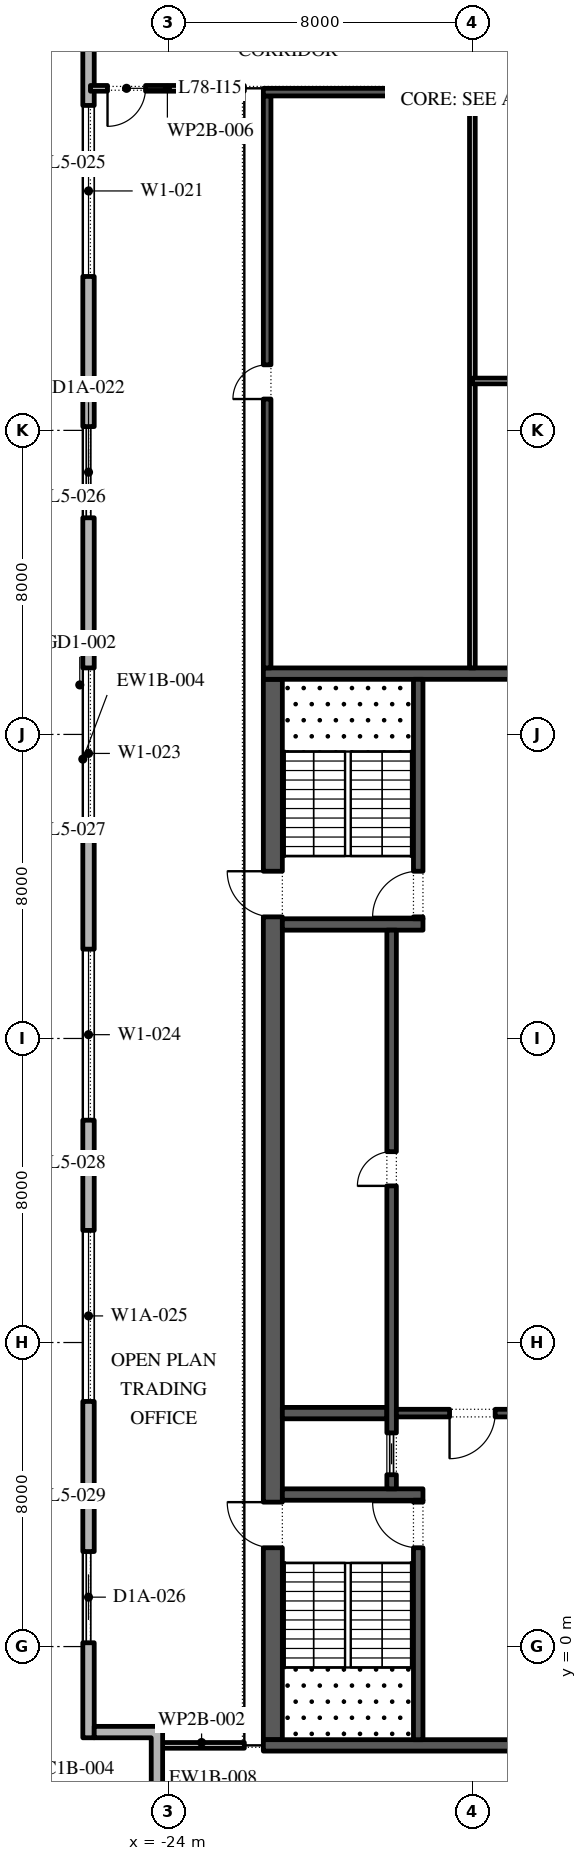
"""IFC4 building model, lengths in metres.
Left out: names, types, materials, properties, quantities, classifications, styles, units other than length and angle.
Written with IfcOpenShell. Run it as: python <this file> out.ifc"""

import sys

from ifc_helpers import new_model, si_unit, direction, frame, frame_2d, origin, place, context, subcontext, project, spatial, polyline, rectangle, outline, extrude, element, fill, save


model = new_model("IFC4")
c1 = context("Model", 3, precision=1e-05, world=origin(), true_north=direction((0.0, 1.0)))
c2 = subcontext(c1, "Body", "Model", "MODEL_VIEW")
j1 = project(units=[si_unit("LENGTHUNIT", "METRE"), si_unit("PLANEANGLEUNIT", "RADIAN")], contexts=[c1])
p1 = place(None, origin())
s1 = spatial("IfcSite", under=j1, at=p1, CompositionType="ELEMENT")
p2 = place(p1, origin())
s2 = spatial("IfcBuilding", under=s1, at=p2, CompositionType="ELEMENT")
p3 = place(p2, frame((0.0, 0.0, 355.2)))
s3 = spatial("IfcBuildingStorey", under=s2, at=p3, CompositionType="ELEMENT", Elevation=355.2)
p4 = place(p3, frame((-26.1, 49.1, 0.0), z_axis=(0.0, 0.0, 1.0), x_axis=(0.0, -1.0, 0.0)))
e1 = element("IfcWall", 1, at=p4, inside=s3, PredefinedType="STANDARD", context=c2, shape_type="SweptSolid", body=[
    extrude(rectangle(XDim=51.5, YDim=0.3, at=frame_2d((25.75, 0.0))), origin(), (0.0, 0.0, 1.0), 3.95),
])
p5 = place(p4, frame((1.3, 0.0, 0.45)))
e2 = element("IfcOpeningElement", 2, at=p5, cuts=e1, PredefinedType="OPENING", context=c2, shape_type="SweptSolid", body=[
    extrude(rectangle(XDim=4.5, YDim=3.05, at=frame_2d((2.25, 1.525))), frame((0.0, 0.16, 0.0), z_axis=(0.0, -1.0, 0.0), x_axis=(1.0, 0.0, 0.0)), (0.0, 0.0, 1.0), 0.32),
])
p6 = place(p4, frame((8.55, 0.0, 0.45)))
e3 = element("IfcOpeningElement", 3, at=p6, cuts=e1, PredefinedType="OPENING", context=c2, shape_type="SweptSolid", body=[
    extrude(rectangle(XDim=4.5, YDim=3.05, at=frame_2d((2.25, 1.525))), frame((0.0, 0.16, 0.0), z_axis=(0.0, -1.0, 0.0), x_axis=(1.0, 0.0, 0.0)), (0.0, 0.0, 1.0), 0.32),
])
p7 = place(p4, frame((17.0, 0.0, 0.0)))
e4 = element("IfcOpeningElement", 4, at=p7, cuts=e1, PredefinedType="OPENING", context=c2, shape_type="SweptSolid", body=[
    extrude(rectangle(XDim=2.4, YDim=3.45, at=frame_2d((1.2, 1.725))), frame((0.0, 0.16, 0.0), z_axis=(0.0, -1.0, 0.0), x_axis=(1.0, 0.0, 0.0)), (0.0, 0.0, 1.0), 0.32),
])
p8 = place(p4, frame((23.35, 0.0, 0.45)))
e5 = element("IfcOpeningElement", 5, at=p8, cuts=e1, PredefinedType="OPENING", context=c2, shape_type="SweptSolid", body=[
    extrude(rectangle(XDim=4.5, YDim=3.05, at=frame_2d((2.25, 1.525))), frame((0.0, 0.16, 0.0), z_axis=(0.0, -1.0, 0.0), x_axis=(1.0, 0.0, 0.0)), (0.0, 0.0, 1.0), 0.32),
])
p9 = place(p4, frame((30.75, 0.0, 0.45)))
e6 = element("IfcOpeningElement", 6, at=p9, cuts=e1, PredefinedType="OPENING", context=c2, shape_type="SweptSolid", body=[
    extrude(rectangle(XDim=4.5, YDim=3.05, at=frame_2d((2.25, 1.525))), frame((0.0, 0.16, 0.0), z_axis=(0.0, -1.0, 0.0), x_axis=(1.0, 0.0, 0.0)), (0.0, 0.0, 1.0), 0.32),
])
p10 = place(p4, frame((38.15, 0.0, 0.45)))
e7 = element("IfcOpeningElement", 7, at=p10, cuts=e1, PredefinedType="OPENING", context=c2, shape_type="SweptSolid", body=[
    extrude(rectangle(XDim=4.5, YDim=3.0, at=frame_2d((2.25, 1.5))), frame((0.0, 0.16, 0.0), z_axis=(0.0, -1.0, 0.0), x_axis=(1.0, 0.0, 0.0)), (0.0, 0.0, 1.0), 0.32),
])
p11 = place(p4, frame((46.6, 0.0, 0.0)))
e8 = element("IfcOpeningElement", 8, at=p11, cuts=e1, PredefinedType="OPENING", context=c2, shape_type="SweptSolid", body=[
    extrude(rectangle(XDim=2.4, YDim=3.45, at=frame_2d((1.2, 1.725))), frame((0.0, 0.16, 0.0), z_axis=(0.0, -1.0, 0.0), x_axis=(1.0, 0.0, 0.0)), (0.0, 0.0, 1.0), 0.32),
])
p12 = place(p3, origin())
e9 = element("IfcWall", 9, at=p12, inside=s3, PredefinedType="STANDARD", context=c2, shape_type="SweptSolid", body=[
    extrude(outline(polyline([(-22.65, -4.2), (-24.45, -4.2), (-24.45, -2.4), (-25.95, -2.4), (-25.95, -2.1), (-24.15, -2.1), (-24.15, -3.9), (-22.35, -3.9), (-22.35, -6.0), (-22.65, -6.0), (-22.65, -4.2)])), origin(), (0.0, 0.0, 1.0), 3.95),
])
p13 = place(p3, frame((-21.25, -2.45, 0.0), z_axis=(0.0, 0.0, 1.0), x_axis=(0.0, 1.0, 0.0)))
e10 = element("IfcWall", 10, at=p13, inside=s3, PredefinedType="SHEAR", context=c2, shape_type="SweptSolid", body=[
    extrude(rectangle(XDim=27.9, YDim=0.5, at=frame_2d((13.95, 0.0))), origin(), (0.0, 0.0, 1.0), 3.95),
])
p14 = place(p13, frame((5.05, 0.0, 0.0)))
e11 = element("IfcOpeningElement", 11, at=p14, cuts=e10, PredefinedType="OPENING", context=c2, shape_type="SweptSolid", body=[
    extrude(rectangle(XDim=1.2, YDim=2.1, at=frame_2d((0.6, 1.05))), frame((0.0, 0.26, 0.0), z_axis=(0.0, -1.0, 0.0), x_axis=(1.0, 0.0, 0.0)), (0.0, 0.0, 1.0), 0.52),
])
p15 = place(p13, frame((21.65, 0.0, 0.0)))
e12 = element("IfcOpeningElement", 12, at=p15, cuts=e10, PredefinedType="OPENING", context=c2, shape_type="SweptSolid", body=[
    extrude(rectangle(XDim=1.2, YDim=2.1, at=frame_2d((0.6, 1.05))), frame((0.0, 0.26, 0.0), z_axis=(0.0, -1.0, 0.0), x_axis=(1.0, 0.0, 0.0)), (0.0, 0.0, 1.0), 0.52),
])
for number, where, z_axis, x_axis in (
    (13, (-21.5, -2.6, 0.0), (0.0, 0.0, 1.0), (1.0, 0.0, 0.0)),
    (14, (-21.5, 25.6, 0.0), (0.0, 0.0, 1.0), (1.0, 0.0, 0.0)),
):
    element("IfcWall", number, at=place(p3, frame(where, z_axis=z_axis, x_axis=x_axis)), inside=s3, PredefinedType="SHEAR", context=c2, shape_type="SweptSolid", body=[
        extrude(rectangle(XDim=11.0, YDim=0.3, at=frame_2d((5.5, 0.0))), origin(), (0.0, 0.0, 1.0), 3.95),
    ])
p16 = place(p3, frame((-21.0, 4.0, 0.0), z_axis=(0.0, 0.0, 1.0), x_axis=(1.0, 0.0, 0.0)))
e15 = element("IfcWall", 15, at=p16, inside=s3, PredefinedType="SHEAR", context=c2, shape_type="SweptSolid", body=[
    extrude(rectangle(XDim=3.7, YDim=0.3, at=frame_2d((1.85, 0.0))), origin(), (0.0, 0.0, 1.0), 3.95),
])
p17 = place(p3, frame((-17.425, -2.45, 0.0), z_axis=(0.0, 0.0, 1.0), x_axis=(0.0, 1.0, 0.0)))
e16 = element("IfcWall", 16, at=p17, inside=s3, PredefinedType="SHEAR", context=c2, shape_type="SweptSolid", body=[
    extrude(rectangle(XDim=6.3, YDim=0.25, at=frame_2d((3.15, 0.0))), origin(), (0.0, 0.0, 1.0), 3.95),
])
p18 = place(p17, frame((5.05, 0.0, 0.0)))
e17 = element("IfcOpeningElement", 17, at=p18, cuts=e16, PredefinedType="OPENING", context=c2, shape_type="SweptSolid", body=[
    extrude(rectangle(XDim=1.2, YDim=2.1, at=frame_2d((0.6, 1.05))), frame((0.0, 0.135, 0.0), z_axis=(0.0, -1.0, 0.0), x_axis=(1.0, 0.0, 0.0)), (0.0, 0.0, 1.0), 0.27),
])
p19 = place(p3, frame((-21.0, 19.0, 0.0), z_axis=(0.0, 0.0, 1.0), x_axis=(1.0, 0.0, 0.0)))
e18 = element("IfcWall", 18, at=p19, inside=s3, PredefinedType="SHEAR", context=c2, shape_type="SweptSolid", body=[
    extrude(rectangle(XDim=3.7, YDim=0.3, at=frame_2d((1.85, 0.0))), origin(), (0.0, 0.0, 1.0), 3.95),
])
p20 = place(p3, frame((-17.425, 19.15, 0.0), z_axis=(0.0, 0.0, 1.0), x_axis=(0.0, 1.0, 0.0)))
e19 = element("IfcWall", 19, at=p20, inside=s3, PredefinedType="SHEAR", context=c2, shape_type="SweptSolid", body=[
    extrude(rectangle(XDim=6.3, YDim=0.25, at=frame_2d((3.15, 0.0))), origin(), (0.0, 0.0, 1.0), 3.95),
])
p21 = place(p20, frame((0.05, 0.0, 0.0)))
e20 = element("IfcOpeningElement", 20, at=p21, cuts=e19, PredefinedType="OPENING", context=c2, shape_type="SweptSolid", body=[
    extrude(rectangle(XDim=1.2, YDim=2.1, at=frame_2d((0.6, 1.05))), frame((0.0, 0.135, 0.0), z_axis=(0.0, -1.0, 0.0), x_axis=(1.0, 0.0, 0.0)), (0.0, 0.0, 1.0), 0.27),
])
p22 = place(p3, frame((-21.0, 6.143, 0.0), z_axis=(0.0, 0.0, 1.0), x_axis=(1.0, 0.0, 0.0)))
e21 = element("IfcWall", 21, at=p22, inside=s3, PredefinedType="SHEAR", context=c2, shape_type="SweptSolid", body=[
    extrude(rectangle(XDim=2.75, YDim=0.3, at=frame_2d((1.375, 0.0))), origin(), (0.0, 0.0, 1.0), 3.95),
])
p23 = place(p3, frame((-18.125, 4.15, 0.0), z_axis=(0.0, 0.0, 1.0), x_axis=(0.0, 1.0, 0.0)))
e22 = element("IfcWall", 22, at=p23, inside=s3, PredefinedType="SHEAR", context=c2, shape_type="SweptSolid", body=[
    extrude(rectangle(XDim=14.7, YDim=0.25, at=frame_2d((7.35, 0.0))), origin(), (0.0, 0.0, 1.0), 3.95),
])
p24 = place(p23, frame((7.971, 0.0, 0.0)))
e23 = element("IfcOpeningElement", 23, at=p24, cuts=e22, PredefinedType="OPENING", context=c2, shape_type="SweptSolid", body=[
    extrude(rectangle(XDim=0.9, YDim=2.1, at=frame_2d((0.45, 1.05))), frame((0.0, 0.135, 0.0), z_axis=(0.0, -1.0, 0.0), x_axis=(1.0, 0.0, 0.0)), (0.0, 0.0, 1.0), 0.27),
])
p25 = place(p23, frame((0.371, 0.0, 0.0)))
e24 = element("IfcOpeningElement", 24, at=p25, cuts=e22, PredefinedType="OPENING", context=c2, shape_type="SweptSolid", body=[
    extrude(rectangle(XDim=1.1, YDim=2.1, at=frame_2d((0.55, 1.05))), frame((0.0, 0.135, 0.0), z_axis=(0.0, -1.0, 0.0), x_axis=(1.0, 0.0, 0.0)), (0.0, 0.0, 1.0), 0.27),
])
p26 = place(p3, frame((-18.0, 6.143, 0.0), z_axis=(0.0, 0.0, 1.0), x_axis=(1.0, 0.0, 0.0)))
e25 = element("IfcWall", 25, at=p26, inside=s3, PredefinedType="SHEAR", context=c2, shape_type="SweptSolid", body=[
    extrude(rectangle(XDim=4.0, YDim=0.2, at=frame_2d((2.0, 0.0))), origin(), (0.0, 0.0, 1.0), 3.95),
])
p27 = place(p26, frame((1.4, 0.0, 0.0)))
e26 = element("IfcOpeningElement", 26, at=p27, cuts=e25, PredefinedType="OPENING", context=c2, shape_type="SweptSolid", body=[
    extrude(rectangle(XDim=1.2, YDim=2.1, at=frame_2d((0.6, 1.05))), frame((0.0, 0.11, 0.0), z_axis=(0.0, -1.0, 0.0), x_axis=(1.0, 0.0, 0.0)), (0.0, 0.0, 1.0), 0.22),
])
p28 = place(p3, frame((-21.4, 25.75, 0.0), z_axis=(0.0, 0.0, 1.0), x_axis=(0.0, 1.0, 0.0)))
e27 = element("IfcWall", 27, at=p28, inside=s3, PredefinedType="SHEAR", context=c2, shape_type="SweptSolid", body=[
    extrude(rectangle(XDim=15.05, YDim=0.2, at=frame_2d((7.525, 0.0))), origin(), (0.0, 0.0, 1.0), 3.95),
])
p29 = place(p28, frame((7.075, 0.0, 0.0)))
e28 = element("IfcOpeningElement", 28, at=p29, cuts=e27, PredefinedType="OPENING", context=c2, shape_type="SweptSolid", body=[
    extrude(rectangle(XDim=0.9, YDim=2.1, at=frame_2d((0.45, 1.05))), frame((0.0, 0.11, 0.0), z_axis=(0.0, -1.0, 0.0), x_axis=(1.0, 0.0, 0.0)), (0.0, 0.0, 1.0), 0.22),
])
p30 = place(p3, frame((-21.5, 40.9, 0.0), z_axis=(0.0, 0.0, 1.0), x_axis=(1.0, 0.0, 0.0)))
e29 = element("IfcWall", 29, at=p30, inside=s3, PredefinedType="SHEAR", context=c2, shape_type="SweptSolid", body=[
    extrude(rectangle(XDim=11.0, YDim=0.2, at=frame_2d((5.5, 0.0))), origin(), (0.0, 0.0, 1.0), 3.95),
])
p31 = place(p3, frame((-16.0, 25.75, 0.0), z_axis=(0.0, 0.0, 1.0), x_axis=(0.0, 1.0, 0.0)))
e30 = element("IfcWall", 30, at=p31, inside=s3, PredefinedType="PARTITIONING", context=c2, shape_type="SweptSolid", body=[
    extrude(rectangle(XDim=15.05, YDim=0.15, at=frame_2d((7.525, 0.0))), origin(), (0.0, 0.0, 1.0), 3.95),
])
p32 = place(p3, frame((-16.0, 33.3, 0.0), z_axis=(0.0, 0.0, 1.0), x_axis=(1.0, 0.0, 0.0)))
e31 = element("IfcWall", 31, at=p32, inside=s3, PredefinedType="PARTITIONING", context=c2, shape_type="SweptSolid", body=[
    extrude(rectangle(XDim=5.3, YDim=0.15, at=frame_2d((2.65, 0.0))), origin(), (0.0, 0.0, 1.0), 3.95),
])
p33 = place(p3, frame((-24.25, -2.6, 0.0), z_axis=(0.0, 0.0, 1.0), x_axis=(1.0, 0.0, 0.0)))
e32 = element("IfcWall", 32, at=p33, inside=s3, PredefinedType="PARTITIONING", context=c2, shape_type="SweptSolid", body=[
    extrude(rectangle(XDim=2.25, YDim=0.15, at=frame_2d((1.125, 0.0))), origin(), (0.0, 0.0, 1.0), 3.95),
])
p34 = place(p3, frame((-22.0, 41.0, 0.0), z_axis=(0.0, 0.0, 1.0), x_axis=(-1.0, 0.0, 0.0)))
e33 = element("IfcWall", 33, at=p34, inside=s3, PredefinedType="PARTITIONING", context=c2, shape_type="SweptSolid", body=[
    extrude(rectangle(XDim=4.05, YDim=0.15, at=frame_2d((2.025, 0.0))), origin(), (0.0, 0.0, 1.0), 3.95),
])
p35 = place(p34, frame((2.6, 0.0, 0.0)))
e34 = element("IfcOpeningElement", 34, at=p35, cuts=e33, PredefinedType="OPENING", context=c2, shape_type="SweptSolid", body=[
    extrude(rectangle(XDim=1.0, YDim=2.1, at=frame_2d((0.5, 1.05))), frame((0.0, 0.085, 0.0), z_axis=(0.0, -1.0, 0.0), x_axis=(1.0, 0.0, 0.0)), (0.0, 0.0, 1.0), 0.17),
])
p36 = place(p6, origin())
e35 = element("IfcWindow", 35, at=p36, inside=s3, PartitioningType="DOUBLE_PANEL_VERTICAL", PredefinedType="WINDOW", context=c2, shape_type="SweptSolid", body=[
    extrude(rectangle(XDim=4.5, YDim=3.05, at=frame_2d((2.25, 1.525))), frame((0.0, 0.03, 0.0), z_axis=(0.0, -1.0, 0.0), x_axis=(1.0, 0.0, 0.0)), (0.0, 0.0, 1.0), 0.06),
])
fill(e3, e35)
p37 = place(p7, origin())
e36 = element("IfcDoor", 36, at=p37, inside=s3, OperationType="DOUBLE_DOOR_SLIDING", PredefinedType="DOOR", context=c2, shape_type="SweptSolid", body=[
    extrude(rectangle(XDim=2.4, YDim=3.45, at=frame_2d((1.2, 1.725))), frame((0.0, 0.025, 0.0), z_axis=(0.0, -1.0, 0.0), x_axis=(1.0, 0.0, 0.0)), (0.0, 0.0, 1.0), 0.05),
])
fill(e4, e36)
p38 = place(p8, origin())
e37 = element("IfcWindow", 37, at=p38, inside=s3, PartitioningType="DOUBLE_PANEL_VERTICAL", PredefinedType="WINDOW", context=c2, shape_type="SweptSolid", body=[
    extrude(rectangle(XDim=4.5, YDim=3.05, at=frame_2d((2.25, 1.525))), frame((0.0, 0.03, 0.0), z_axis=(0.0, -1.0, 0.0), x_axis=(1.0, 0.0, 0.0)), (0.0, 0.0, 1.0), 0.06),
])
fill(e5, e37)
p39 = place(p9, origin())
e38 = element("IfcWindow", 38, at=p39, inside=s3, PartitioningType="DOUBLE_PANEL_VERTICAL", PredefinedType="WINDOW", context=c2, shape_type="SweptSolid", body=[
    extrude(rectangle(XDim=4.5, YDim=3.05, at=frame_2d((2.25, 1.525))), frame((0.0, 0.03, 0.0), z_axis=(0.0, -1.0, 0.0), x_axis=(1.0, 0.0, 0.0)), (0.0, 0.0, 1.0), 0.06),
])
fill(e6, e38)
p40 = place(p10, origin())
e39 = element("IfcWindow", 39, at=p40, inside=s3, PartitioningType="DOUBLE_PANEL_VERTICAL", PredefinedType="WINDOW", context=c2, shape_type="SweptSolid", body=[
    extrude(rectangle(XDim=4.5, YDim=3.0, at=frame_2d((2.25, 1.5))), frame((0.0, 0.03, 0.0), z_axis=(0.0, -1.0, 0.0), x_axis=(1.0, 0.0, 0.0)), (0.0, 0.0, 1.0), 0.06),
])
fill(e7, e39)
p41 = place(p11, origin())
e40 = element("IfcDoor", 40, at=p41, inside=s3, OperationType="DOUBLE_DOOR_SLIDING", PredefinedType="DOOR", context=c2, shape_type="SweptSolid", body=[
    extrude(rectangle(XDim=2.4, YDim=3.45, at=frame_2d((1.2, 1.725))), frame((0.0, 0.025, 0.0), z_axis=(0.0, -1.0, 0.0), x_axis=(1.0, 0.0, 0.0)), (0.0, 0.0, 1.0), 0.05),
])
fill(e8, e40)
p42 = place(p24, origin())
e41 = element("IfcDoor", 41, at=p42, inside=s3, OperationType="SINGLE_SWING_RIGHT", PredefinedType="DOOR", context=c2, shape_type="SweptSolid", body=[
    extrude(rectangle(XDim=0.9, YDim=2.1, at=frame_2d((0.45, 1.05))), frame((0.0, 0.125, 0.0), z_axis=(0.0, -1.0, 0.0), x_axis=(1.0, 0.0, 0.0)), (0.0, 0.0, 1.0), 0.05),
])
fill(e23, e41)
p43 = place(p25, origin())
e42 = element("IfcDoor", 42, at=p43, inside=s3, OperationType="SLIDING_TO_LEFT", PredefinedType="DOOR", context=c2, shape_type="SweptSolid", body=[
    extrude(rectangle(XDim=1.1, YDim=2.1, at=frame_2d((0.55, 1.05))), frame((0.0, 0.025, 0.0), z_axis=(0.0, -1.0, 0.0), x_axis=(1.0, 0.0, 0.0)), (0.0, 0.0, 1.0), 0.05),
])
fill(e24, e42)
p44 = place(p27, frame((1.2, 0.0, 0.0), z_axis=(0.0, 0.0, 1.0), x_axis=(-1.0, 0.0, 0.0)))
e43 = element("IfcDoor", 43, at=p44, inside=s3, OperationType="SINGLE_SWING_LEFT", PredefinedType="DOOR", context=c2, shape_type="SweptSolid", body=[
    extrude(rectangle(XDim=1.2, YDim=2.1, at=frame_2d((0.6, 1.05))), frame((0.0, 0.025, 0.0), z_axis=(0.0, -1.0, 0.0), x_axis=(1.0, 0.0, 0.0)), (0.0, 0.0, 1.0), 0.05),
])
fill(e26, e43)
p45 = place(p18, origin())
e44 = element("IfcDoor", 44, at=p45, inside=s3, OperationType="SINGLE_SWING_LEFT", PredefinedType="DOOR", context=c2, shape_type="SweptSolid", body=[
    extrude(rectangle(XDim=1.2, YDim=2.1, at=frame_2d((0.6, 1.05))), frame((0.0, 0.025, 0.0), z_axis=(0.0, -1.0, 0.0), x_axis=(1.0, 0.0, 0.0)), (0.0, 0.0, 1.0), 0.05),
])
fill(e17, e44)
p46 = place(p14, origin())
e45 = element("IfcDoor", 45, at=p46, inside=s3, OperationType="SINGLE_SWING_LEFT", PredefinedType="DOOR", context=c2, shape_type="SweptSolid", body=[
    extrude(rectangle(XDim=1.2, YDim=2.1, at=frame_2d((0.6, 1.05))), frame((0.0, 0.025, 0.0), z_axis=(0.0, -1.0, 0.0), x_axis=(1.0, 0.0, 0.0)), (0.0, 0.0, 1.0), 0.05),
])
fill(e11, e45)
p47 = place(p21, origin())
e46 = element("IfcDoor", 46, at=p47, inside=s3, OperationType="SINGLE_SWING_RIGHT", PredefinedType="DOOR", context=c2, shape_type="SweptSolid", body=[
    extrude(rectangle(XDim=1.2, YDim=2.1, at=frame_2d((0.6, 1.05))), frame((0.0, 0.025, 0.0), z_axis=(0.0, -1.0, 0.0), x_axis=(1.0, 0.0, 0.0)), (0.0, 0.0, 1.0), 0.05),
])
fill(e20, e46)
p48 = place(p15, origin())
e47 = element("IfcDoor", 47, at=p48, inside=s3, OperationType="SINGLE_SWING_LEFT", PredefinedType="DOOR", context=c2, shape_type="SweptSolid", body=[
    extrude(rectangle(XDim=1.2, YDim=2.1, at=frame_2d((0.6, 1.05))), frame((0.0, 0.025, 0.0), z_axis=(0.0, -1.0, 0.0), x_axis=(1.0, 0.0, 0.0)), (0.0, 0.0, 1.0), 0.05),
])
fill(e12, e47)
p49 = place(p29, origin())
e48 = element("IfcDoor", 48, at=p49, inside=s3, OperationType="SINGLE_SWING_RIGHT", PredefinedType="DOOR", context=c2, shape_type="SweptSolid", body=[
    extrude(rectangle(XDim=0.9, YDim=2.1, at=frame_2d((0.45, 1.05))), frame((0.0, -0.05, 0.0), z_axis=(0.0, -1.0, 0.0), x_axis=(1.0, 0.0, 0.0)), (0.0, 0.0, 1.0), 0.05),
])
fill(e28, e48)
p50 = place(p35, origin())
e49 = element("IfcDoor", 49, at=p50, inside=s3, OperationType="SINGLE_SWING_LEFT", PredefinedType="DOOR", context=c2, shape_type="SweptSolid", body=[
    extrude(rectangle(XDim=1.0, YDim=2.1, at=frame_2d((0.5, 1.05))), frame((0.0, 0.025, 0.0), z_axis=(0.0, -1.0, 0.0), x_axis=(1.0, 0.0, 0.0)), (0.0, 0.0, 1.0), 0.05),
])
fill(e34, e49)
save(model, sys.argv[1])
